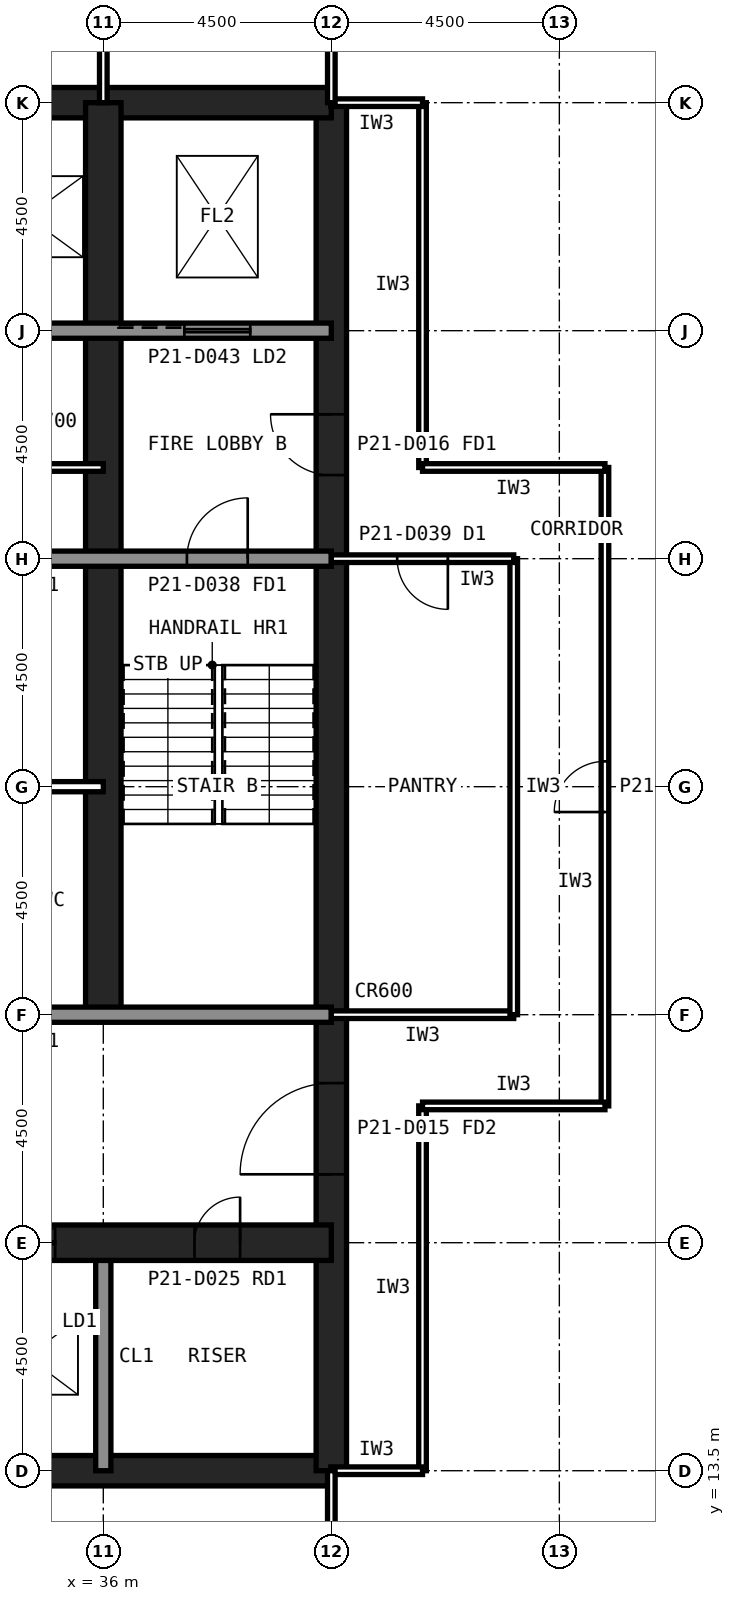
"""IFC4 building model, lengths in metres.
Left out: names, types, materials, properties, quantities, classifications, styles, units other than length and angle.
Written with IfcOpenShell. Run it as: python <this file> out.ifc"""

import sys

from ifc_helpers import new_model, si_unit, direction, frame, frame_2d, origin, place, context, subcontext, project, spatial, rectangle, extrude, element, fill, save


model = new_model("IFC4")
c1 = context("Model", 3, precision=1e-05, world=origin(), true_north=direction((0.0, 1.0)))
c2 = subcontext(c1, "Body", "Model", "MODEL_VIEW")
j1 = project(units=[si_unit("LENGTHUNIT", "METRE"), si_unit("PLANEANGLEUNIT", "RADIAN")], contexts=[c1])
p1 = place(None, origin())
s1 = spatial("IfcSite", under=j1, at=p1, CompositionType="ELEMENT")
p2 = place(p1, origin())
s2 = spatial("IfcBuilding", under=s1, at=p2, CompositionType="ELEMENT")
p3 = place(p2, frame((0.0, 0.0, 87.8)))
s3 = spatial("IfcBuildingStorey", under=s2, at=p3, CompositionType="ELEMENT", Elevation=87.8)
p4 = place(p3, frame((13.5, 13.5, 0.0), z_axis=(0.0, 0.0, 1.0), x_axis=(1.0, 0.0, 0.0)))
e1 = element("IfcWall", 1, at=p4, inside=s3, PredefinedType="SHEAR", context=c2, shape_type="SweptSolid", body=[
    extrude(rectangle(XDim=27.0, YDim=0.6, at=frame_2d((13.5, 0.0))), origin(), (0.0, 0.0, 1.0), 4.2),
])
p5 = place(p3, frame((40.5, 13.5, 0.0), z_axis=(0.0, 0.0, 1.0), x_axis=(0.0, 1.0, 0.0)))
e2 = element("IfcWall", 2, at=p5, inside=s3, PredefinedType="SHEAR", context=c2, shape_type="SweptSolid", body=[
    extrude(rectangle(XDim=27.0, YDim=0.6, at=frame_2d((13.5, 0.0))), origin(), (0.0, 0.0, 1.0), 4.2),
])
p6 = place(p5, frame((5.85, 0.0, 0.0)))
e3 = element("IfcOpeningElement", 3, at=p6, cuts=e2, PredefinedType="OPENING", context=c2, shape_type="SweptSolid", body=[
    extrude(rectangle(XDim=1.8, YDim=2.1, at=frame_2d((0.9, 1.05))), frame((0.0, 0.31, 0.0), z_axis=(0.0, -1.0, 0.0), x_axis=(1.0, 0.0, 0.0)), (0.0, 0.0, 1.0), 0.62),
])
p7 = place(p5, frame((19.65, 0.0, 0.0)))
e4 = element("IfcOpeningElement", 4, at=p7, cuts=e2, PredefinedType="OPENING", context=c2, shape_type="SweptSolid", body=[
    extrude(rectangle(XDim=1.2, YDim=2.1, at=frame_2d((0.6, 1.05))), frame((0.0, 0.31, 0.0), z_axis=(0.0, -1.0, 0.0), x_axis=(1.0, 0.0, 0.0)), (0.0, 0.0, 1.0), 0.62),
])
p8 = place(p3, frame((40.5, 40.5, 0.0), z_axis=(0.0, 0.0, 1.0), x_axis=(-1.0, 0.0, 0.0)))
e5 = element("IfcWall", 5, at=p8, inside=s3, PredefinedType="SHEAR", context=c2, shape_type="SweptSolid", body=[
    extrude(rectangle(XDim=27.0, YDim=0.6, at=frame_2d((13.5, 0.0))), origin(), (0.0, 0.0, 1.0), 4.2),
])
p9 = place(p3, frame((36.0, 13.5, 0.0), z_axis=(0.0, 0.0, 1.0), x_axis=(0.0, 1.0, 0.0)))
e6 = element("IfcWall", 6, at=p9, inside=s3, PredefinedType="SOLIDWALL", context=c2, shape_type="SweptSolid", body=[
    extrude(rectangle(XDim=4.5, YDim=0.3, at=frame_2d((2.25, 0.0))), origin(), (0.0, 0.0, 1.0), 4.04),
])
p10 = place(p3, frame((36.0, 22.5, 0.0), z_axis=(0.0, 0.0, 1.0), x_axis=(0.0, 1.0, 0.0)))
e7 = element("IfcWall", 7, at=p10, inside=s3, PredefinedType="SHEAR", context=c2, shape_type="SweptSolid", body=[
    extrude(rectangle(XDim=18.0, YDim=0.7, at=frame_2d((9.0, 0.0))), origin(), (0.0, 0.0, 1.0), 4.2),
])
p11 = place(p3, frame((13.5, 18.0, 0.0), z_axis=(0.0, 0.0, 1.0), x_axis=(1.0, 0.0, 0.0)))
e8 = element("IfcWall", 8, at=p11, inside=s3, PredefinedType="SHEAR", context=c2, shape_type="SweptSolid", body=[
    extrude(rectangle(XDim=27.0, YDim=0.7, at=frame_2d((13.5, 0.0))), origin(), (0.0, 0.0, 1.0), 4.2),
])
p12 = place(p11, frame((24.3, 0.0, 0.0)))
e9 = element("IfcOpeningElement", 9, at=p12, cuts=e8, PredefinedType="OPENING", context=c2, shape_type="SweptSolid", body=[
    extrude(rectangle(XDim=0.9, YDim=2.1, at=frame_2d((0.45, 1.05))), frame((0.0, 0.36, 0.0), z_axis=(0.0, -1.0, 0.0), x_axis=(1.0, 0.0, 0.0)), (0.0, 0.0, 1.0), 0.72),
])
p13 = place(p11, frame((5.45, 0.0, 0.0)))
e10 = element("IfcOpeningElement", 10, at=p13, cuts=e8, PredefinedType="OPENING", context=c2, shape_type="SweptSolid", body=[
    extrude(rectangle(XDim=1.1, YDim=2.1, at=frame_2d((0.55, 1.05))), frame((0.0, 0.36, 0.0), z_axis=(0.0, -1.0, 0.0), x_axis=(1.0, 0.0, 0.0)), (0.0, 0.0, 1.0), 0.72),
])
p14 = place(p11, frame((8.45, 0.0, 0.0)))
e11 = element("IfcOpeningElement", 11, at=p14, cuts=e8, PredefinedType="OPENING", context=c2, shape_type="SweptSolid", body=[
    extrude(rectangle(XDim=1.1, YDim=2.1, at=frame_2d((0.55, 1.05))), frame((0.0, 0.36, 0.0), z_axis=(0.0, -1.0, 0.0), x_axis=(1.0, 0.0, 0.0)), (0.0, 0.0, 1.0), 0.72),
])
p15 = place(p11, frame((11.45, 0.0, 0.0)))
e12 = element("IfcOpeningElement", 12, at=p15, cuts=e8, PredefinedType="OPENING", context=c2, shape_type="SweptSolid", body=[
    extrude(rectangle(XDim=1.1, YDim=2.1, at=frame_2d((0.55, 1.05))), frame((0.0, 0.36, 0.0), z_axis=(0.0, -1.0, 0.0), x_axis=(1.0, 0.0, 0.0)), (0.0, 0.0, 1.0), 0.72),
])
p16 = place(p11, frame((14.45, 0.0, 0.0)))
e13 = element("IfcOpeningElement", 13, at=p16, cuts=e8, PredefinedType="OPENING", context=c2, shape_type="SweptSolid", body=[
    extrude(rectangle(XDim=1.1, YDim=2.1, at=frame_2d((0.55, 1.05))), frame((0.0, 0.36, 0.0), z_axis=(0.0, -1.0, 0.0), x_axis=(1.0, 0.0, 0.0)), (0.0, 0.0, 1.0), 0.72),
])
p17 = place(p11, frame((17.45, 0.0, 0.0)))
e14 = element("IfcOpeningElement", 14, at=p17, cuts=e8, PredefinedType="OPENING", context=c2, shape_type="SweptSolid", body=[
    extrude(rectangle(XDim=1.1, YDim=2.1, at=frame_2d((0.55, 1.05))), frame((0.0, 0.36, 0.0), z_axis=(0.0, -1.0, 0.0), x_axis=(1.0, 0.0, 0.0)), (0.0, 0.0, 1.0), 0.72),
])
p18 = place(p11, frame((20.45, 0.0, 0.0)))
e15 = element("IfcOpeningElement", 15, at=p18, cuts=e8, PredefinedType="OPENING", context=c2, shape_type="SweptSolid", body=[
    extrude(rectangle(XDim=1.1, YDim=2.1, at=frame_2d((0.55, 1.05))), frame((0.0, 0.36, 0.0), z_axis=(0.0, -1.0, 0.0), x_axis=(1.0, 0.0, 0.0)), (0.0, 0.0, 1.0), 0.72),
])
p19 = place(p11, frame((1.6, 0.0, 0.0)))
e16 = element("IfcOpeningElement", 16, at=p19, cuts=e8, PredefinedType="OPENING", context=c2, shape_type="SweptSolid", body=[
    extrude(rectangle(XDim=1.3, YDim=2.2, at=frame_2d((0.65, 1.1))), frame((0.0, 0.36, 0.0), z_axis=(0.0, -1.0, 0.0), x_axis=(1.0, 0.0, 0.0)), (0.0, 0.0, 1.0), 0.72),
])
p20 = place(p3, frame((13.5, 36.0, 0.0), z_axis=(0.0, 0.0, 1.0), x_axis=(1.0, 0.0, 0.0)))
e17 = element("IfcWall", 17, at=p20, inside=s3, PredefinedType="SOLIDWALL", context=c2, shape_type="SweptSolid", body=[
    extrude(rectangle(XDim=27.0, YDim=0.3, at=frame_2d((13.5, 0.0))), origin(), (0.0, 0.0, 1.0), 4.04),
])
p21 = place(p20, frame((1.8, 0.0, 0.0)))
e18 = element("IfcOpeningElement", 18, at=p21, cuts=e17, PredefinedType="OPENING", context=c2, shape_type="SweptSolid", body=[
    extrude(rectangle(XDim=0.9, YDim=2.1, at=frame_2d((0.45, 1.05))), frame((0.0, 0.16, 0.0), z_axis=(0.0, -1.0, 0.0), x_axis=(1.0, 0.0, 0.0)), (0.0, 0.0, 1.0), 0.32),
])
p22 = place(p20, frame((24.1, 0.0, 0.0)))
e19 = element("IfcOpeningElement", 19, at=p22, cuts=e17, PredefinedType="OPENING", context=c2, shape_type="SweptSolid", body=[
    extrude(rectangle(XDim=1.3, YDim=2.2, at=frame_2d((0.65, 1.1))), frame((0.0, 0.16, 0.0), z_axis=(0.0, -1.0, 0.0), x_axis=(1.0, 0.0, 0.0)), (0.0, 0.0, 1.0), 0.32),
])
p23 = place(p3, frame((13.5, 22.5, 0.0), z_axis=(0.0, 0.0, 1.0), x_axis=(1.0, 0.0, 0.0)))
e20 = element("IfcWall", 20, at=p23, inside=s3, PredefinedType="SOLIDWALL", context=c2, shape_type="SweptSolid", body=[
    extrude(rectangle(XDim=27.0, YDim=0.3, at=frame_2d((13.5, 0.0))), origin(), (0.0, 0.0, 1.0), 4.04),
])
p24 = place(p23, frame((1.65, 0.0, 0.0)))
e21 = element("IfcOpeningElement", 21, at=p24, cuts=e20, PredefinedType="OPENING", context=c2, shape_type="SweptSolid", body=[
    extrude(rectangle(XDim=1.2, YDim=2.1, at=frame_2d((0.6, 1.05))), frame((0.0, 0.16, 0.0), z_axis=(0.0, -1.0, 0.0), x_axis=(1.0, 0.0, 0.0)), (0.0, 0.0, 1.0), 0.32),
])
p25 = place(p23, frame((6.025, 0.0, 0.0)))
e22 = element("IfcOpeningElement", 22, at=p25, cuts=e20, PredefinedType="OPENING", context=c2, shape_type="SweptSolid", body=[
    extrude(rectangle(XDim=1.0, YDim=2.1, at=frame_2d((0.5, 1.05))), frame((0.0, 0.16, 0.0), z_axis=(0.0, -1.0, 0.0), x_axis=(1.0, 0.0, 0.0)), (0.0, 0.0, 1.0), 0.32),
])
p26 = place(p23, frame((10.525, 0.0, 0.0)))
e23 = element("IfcOpeningElement", 23, at=p26, cuts=e20, PredefinedType="OPENING", context=c2, shape_type="SweptSolid", body=[
    extrude(rectangle(XDim=1.0, YDim=2.1, at=frame_2d((0.5, 1.05))), frame((0.0, 0.16, 0.0), z_axis=(0.0, -1.0, 0.0), x_axis=(1.0, 0.0, 0.0)), (0.0, 0.0, 1.0), 0.32),
])
p27 = place(p23, frame((19.75, 0.0, 0.0)))
e24 = element("IfcOpeningElement", 24, at=p27, cuts=e20, PredefinedType="OPENING", context=c2, shape_type="SweptSolid", body=[
    extrude(rectangle(XDim=1.0, YDim=2.1, at=frame_2d((0.5, 1.05))), frame((0.0, 0.16, 0.0), z_axis=(0.0, -1.0, 0.0), x_axis=(1.0, 0.0, 0.0)), (0.0, 0.0, 1.0), 0.32),
])
p28 = place(p23, frame((15.05, 0.0, 0.0)))
e25 = element("IfcOpeningElement", 25, at=p28, cuts=e20, PredefinedType="OPENING", context=c2, shape_type="SweptSolid", body=[
    extrude(rectangle(XDim=1.4, YDim=2.4, at=frame_2d((0.7, 1.2))), frame((0.0, 0.16, 0.0), z_axis=(0.0, -1.0, 0.0), x_axis=(1.0, 0.0, 0.0)), (0.0, 0.0, 1.0), 0.32),
])
p29 = place(p3, frame((13.5, 31.5, 0.0), z_axis=(0.0, 0.0, 1.0), x_axis=(1.0, 0.0, 0.0)))
e26 = element("IfcWall", 26, at=p29, inside=s3, PredefinedType="SOLIDWALL", context=c2, shape_type="SweptSolid", body=[
    extrude(rectangle(XDim=27.0, YDim=0.3, at=frame_2d((13.5, 0.0))), origin(), (0.0, 0.0, 1.0), 4.04),
])
p30 = place(p29, frame((24.15, 0.0, 0.0)))
e27 = element("IfcOpeningElement", 27, at=p30, cuts=e26, PredefinedType="OPENING", context=c2, shape_type="SweptSolid", body=[
    extrude(rectangle(XDim=1.2, YDim=2.1, at=frame_2d((0.6, 1.05))), frame((0.0, 0.16, 0.0), z_axis=(0.0, -1.0, 0.0), x_axis=(1.0, 0.0, 0.0)), (0.0, 0.0, 1.0), 0.32),
])
p31 = place(p29, frame((15.3, 0.0, 0.0)))
e28 = element("IfcOpeningElement", 28, at=p31, cuts=e26, PredefinedType="OPENING", context=c2, shape_type="SweptSolid", body=[
    extrude(rectangle(XDim=0.9, YDim=2.1, at=frame_2d((0.45, 1.05))), frame((0.0, 0.16, 0.0), z_axis=(0.0, -1.0, 0.0), x_axis=(1.0, 0.0, 0.0)), (0.0, 0.0, 1.0), 0.32),
])
p32 = place(p29, frame((19.8, 0.0, 0.0)))
e29 = element("IfcOpeningElement", 29, at=p32, cuts=e26, PredefinedType="OPENING", context=c2, shape_type="SweptSolid", body=[
    extrude(rectangle(XDim=0.9, YDim=2.1, at=frame_2d((0.45, 1.05))), frame((0.0, 0.16, 0.0), z_axis=(0.0, -1.0, 0.0), x_axis=(1.0, 0.0, 0.0)), (0.0, 0.0, 1.0), 0.32),
])
p33 = place(p3, frame((27.0, 27.0, 0.0), z_axis=(0.0, 0.0, 1.0), x_axis=(1.0, 0.0, 0.0)))
e30 = element("IfcWall", 30, at=p33, inside=s3, PredefinedType="PARTITIONING", context=c2, shape_type="SweptSolid", body=[
    extrude(rectangle(XDim=9.0, YDim=0.2, at=frame_2d((4.5, 0.0))), origin(), (0.0, 0.0, 1.0), 4.04),
])
p34 = place(p3, frame((45.9, 20.7, 0.0), z_axis=(0.0, 0.0, 1.0), x_axis=(0.0, 1.0, 0.0)))
e31 = element("IfcWall", 31, at=p34, inside=s3, PredefinedType="PARTITIONING", context=c2, shape_type="SweptSolid", body=[
    extrude(rectangle(XDim=12.6, YDim=0.15, at=frame_2d((6.3, 0.0))), origin(), (0.0, 0.0, 1.0), 4.04),
])
p35 = place(p34, frame((5.8, 0.0, 0.0)))
e32 = element("IfcOpeningElement", 32, at=p35, cuts=e31, PredefinedType="OPENING", context=c2, shape_type="SweptSolid", body=[
    extrude(rectangle(XDim=1.0, YDim=2.1, at=frame_2d((0.5, 1.05))), frame((0.0, 0.085, 0.0), z_axis=(0.0, -1.0, 0.0), x_axis=(1.0, 0.0, 0.0)), (0.0, 0.0, 1.0), 0.17),
])
for number, where, z_axis, x_axis in (
    (33, (42.3, 13.5, 0.0), (0.0, 0.0, 1.0), (0.0, 1.0, 0.0)),
    (34, (42.3, 33.3, 0.0), (0.0, 0.0, 1.0), (0.0, 1.0, 0.0)),
):
    element("IfcWall", number, at=place(p3, frame(where, z_axis=z_axis, x_axis=x_axis)), inside=s3, PredefinedType="PARTITIONING", context=c2, shape_type="SweptSolid", body=[
        extrude(rectangle(XDim=7.2, YDim=0.15, at=frame_2d((3.6, 0.0))), origin(), (0.0, 0.0, 1.0), 4.04),
    ])
for number, where, z_axis, x_axis in (
    (35, (42.3, 20.7, 0.0), (0.0, 0.0, 1.0), (1.0, 0.0, 0.0)),
    (36, (45.9, 33.3, 0.0), (0.0, 0.0, 1.0), (-1.0, 0.0, 0.0)),
):
    element("IfcWall", number, at=place(p3, frame(where, z_axis=z_axis, x_axis=x_axis)), inside=s3, PredefinedType="PARTITIONING", context=c2, shape_type="SweptSolid", body=[
        extrude(rectangle(XDim=3.6, YDim=0.15, at=frame_2d((1.8, 0.0))), origin(), (0.0, 0.0, 1.0), 4.04),
    ])
for number, where, z_axis, x_axis in (
    (37, (40.49, 13.5, 0.0), (0.0, 0.0, 1.0), (1.0, 0.0, 0.0)),
    (38, (42.3, 40.5, 0.0), (0.0, 0.0, 1.0), (-1.0, 0.0, 0.0)),
):
    element("IfcWall", number, at=place(p3, frame(where, z_axis=z_axis, x_axis=x_axis)), inside=s3, PredefinedType="PARTITIONING", context=c2, shape_type="SweptSolid", body=[
        extrude(rectangle(XDim=1.81, YDim=0.15, at=frame_2d((0.905, 0.0))), origin(), (0.0, 0.0, 1.0), 3.189),
    ])
p36 = place(p3, frame((40.5, 22.5, 0.0), z_axis=(0.0, 0.0, 1.0), x_axis=(1.0, 0.0, 0.0)))
e39 = element("IfcWall", 39, at=p36, inside=s3, PredefinedType="PARTITIONING", context=c2, shape_type="SweptSolid", body=[
    extrude(rectangle(XDim=3.6, YDim=0.15, at=frame_2d((1.8, 0.0))), origin(), (0.0, 0.0, 1.0), 3.189),
])
p37 = place(p3, frame((44.1, 22.5, 0.0), z_axis=(0.0, 0.0, 1.0), x_axis=(0.0, 1.0, 0.0)))
e40 = element("IfcWall", 40, at=p37, inside=s3, PredefinedType="PARTITIONING", context=c2, shape_type="SweptSolid", body=[
    extrude(rectangle(XDim=9.0, YDim=0.15, at=frame_2d((4.5, 0.0))), origin(), (0.0, 0.0, 1.0), 4.04),
])
p38 = place(p3, frame((44.1, 31.5, 0.0), z_axis=(0.0, 0.0, 1.0), x_axis=(-1.0, 0.0, 0.0)))
e41 = element("IfcWall", 41, at=p38, inside=s3, PredefinedType="PARTITIONING", context=c2, shape_type="SweptSolid", body=[
    extrude(rectangle(XDim=3.6, YDim=0.15, at=frame_2d((1.8, 0.0))), origin(), (0.0, 0.0, 1.0), 3.189),
])
p39 = place(p38, frame((1.3, 0.0, 0.0)))
e42 = element("IfcOpeningElement", 42, at=p39, cuts=e41, PredefinedType="OPENING", context=c2, shape_type="SweptSolid", body=[
    extrude(rectangle(XDim=1.0, YDim=2.1, at=frame_2d((0.5, 1.05))), frame((0.0, 0.085, 0.0), z_axis=(0.0, -1.0, 0.0), x_axis=(1.0, 0.0, 0.0)), (0.0, 0.0, 1.0), 0.17),
])
p40 = place(p3, frame((36.0, 40.5, 0.0), z_axis=(0.0, 0.0, 1.0), x_axis=(0.0, 1.0, 0.0)))
e43 = element("IfcWall", 43, at=p40, inside=s3, PredefinedType="PARTITIONING", context=c2, shape_type="SweptSolid", body=[
    extrude(rectangle(XDim=4.5, YDim=0.15, at=frame_2d((2.25, 0.0))), origin(), (0.0, 0.0, 1.0), 3.189),
])
p41 = place(p3, frame((40.5, 53.555, 0.0), z_axis=(0.0, 0.0, 1.0), x_axis=(0.0, -1.0, 0.0)))
e44 = element("IfcWall", 44, at=p41, inside=s3, PredefinedType="PARTITIONING", context=c2, shape_type="SweptSolid", body=[
    extrude(rectangle(XDim=13.055, YDim=0.15, at=frame_2d((6.527, 0.0))), origin(), (0.0, 0.0, 1.0), 3.189),
])
p42 = place(p41, frame((6.028, 0.0, 0.0)))
e45 = element("IfcOpeningElement", 45, at=p42, cuts=e44, PredefinedType="OPENING", context=c2, shape_type="SweptSolid", body=[
    extrude(rectangle(XDim=1.0, YDim=2.1, at=frame_2d((0.5, 1.05))), frame((0.0, 0.085, 0.0), z_axis=(0.0, -1.0, 0.0), x_axis=(1.0, 0.0, 0.0)), (0.0, 0.0, 1.0), 0.17),
])
p43 = place(p3, frame((40.5, 0.445, 0.0), z_axis=(0.0, 0.0, 1.0), x_axis=(0.0, 1.0, 0.0)))
e46 = element("IfcWall", 46, at=p43, inside=s3, PredefinedType="PARTITIONING", context=c2, shape_type="SweptSolid", body=[
    extrude(rectangle(XDim=13.055, YDim=0.15, at=frame_2d((6.527, 0.0))), origin(), (0.0, 0.0, 1.0), 3.189),
])
p44 = place(p43, frame((6.028, 0.0, 0.0)))
e47 = element("IfcOpeningElement", 47, at=p44, cuts=e46, PredefinedType="OPENING", context=c2, shape_type="SweptSolid", body=[
    extrude(rectangle(XDim=1.0, YDim=2.1, at=frame_2d((0.5, 1.05))), frame((0.0, 0.085, 0.0), z_axis=(0.0, -1.0, 0.0), x_axis=(1.0, 0.0, 0.0)), (0.0, 0.0, 1.0), 0.17),
])
p45 = place(p6, origin())
e48 = element("IfcDoor", 48, at=p45, inside=s3, OperationType="SINGLE_SWING_LEFT", PredefinedType="DOOR", context=c2, shape_type="SweptSolid", body=[
    extrude(rectangle(XDim=1.8, YDim=2.1, at=frame_2d((0.9, 1.05))), frame((0.0, 0.025, 0.0), z_axis=(0.0, -1.0, 0.0), x_axis=(1.0, 0.0, 0.0)), (0.0, 0.0, 1.0), 0.05),
])
fill(e3, e48)
p46 = place(p7, origin())
e49 = element("IfcDoor", 49, at=p46, inside=s3, OperationType="SINGLE_SWING_RIGHT", PredefinedType="DOOR", context=c2, shape_type="SweptSolid", body=[
    extrude(rectangle(XDim=1.2, YDim=2.1, at=frame_2d((0.6, 1.05))), frame((0.0, 0.025, 0.0), z_axis=(0.0, -1.0, 0.0), x_axis=(1.0, 0.0, 0.0)), (0.0, 0.0, 1.0), 0.05),
])
fill(e4, e49)
p47 = place(p30, origin())
e50 = element("IfcDoor", 50, at=p47, inside=s3, OperationType="SINGLE_SWING_RIGHT", PredefinedType="DOOR", context=c2, shape_type="SweptSolid", body=[
    extrude(rectangle(XDim=1.2, YDim=2.1, at=frame_2d((0.6, 1.05))), frame((0.0, 0.025, 0.0), z_axis=(0.0, -1.0, 0.0), x_axis=(1.0, 0.0, 0.0)), (0.0, 0.0, 1.0), 0.05),
])
fill(e27, e50)
p48 = place(p12, origin())
e51 = element("IfcDoor", 51, at=p48, inside=s3, OperationType="SINGLE_SWING_RIGHT", PredefinedType="DOOR", context=c2, shape_type="SweptSolid", body=[
    extrude(rectangle(XDim=0.9, YDim=2.1, at=frame_2d((0.45, 1.05))), frame((0.0, 0.025, 0.0), z_axis=(0.0, -1.0, 0.0), x_axis=(1.0, 0.0, 0.0)), (0.0, 0.0, 1.0), 0.05),
])
fill(e9, e51)
p49 = place(p18, origin())
e52 = element("IfcDoor", 52, at=p49, inside=s3, OperationType="SLIDING_TO_LEFT", PredefinedType="DOOR", context=c2, shape_type="SweptSolid", body=[
    extrude(rectangle(XDim=1.1, YDim=2.1, at=frame_2d((0.55, 1.05))), frame((0.0, 0.025, 0.0), z_axis=(0.0, -1.0, 0.0), x_axis=(1.0, 0.0, 0.0)), (0.0, 0.0, 1.0), 0.05),
])
fill(e15, e52)
p50 = place(p22, origin())
e53 = element("IfcDoor", 53, at=p50, inside=s3, OperationType="SLIDING_TO_LEFT", PredefinedType="DOOR", context=c2, shape_type="SweptSolid", body=[
    extrude(rectangle(XDim=1.3, YDim=2.2, at=frame_2d((0.65, 1.1))), frame((0.0, 0.025, 0.0), z_axis=(0.0, -1.0, 0.0), x_axis=(1.0, 0.0, 0.0)), (0.0, 0.0, 1.0), 0.05),
])
fill(e19, e53)
p51 = place(p35, origin())
e54 = element("IfcDoor", 54, at=p51, inside=s3, OperationType="SINGLE_SWING_LEFT", PredefinedType="DOOR", context=c2, shape_type="SweptSolid", body=[
    extrude(rectangle(XDim=1.0, YDim=2.1, at=frame_2d((0.5, 1.05))), frame((0.0, 0.025, 0.0), z_axis=(0.0, -1.0, 0.0), x_axis=(1.0, 0.0, 0.0)), (0.0, 0.0, 1.0), 0.05),
])
fill(e32, e54)
p52 = place(p39, origin())
e55 = element("IfcDoor", 55, at=p52, inside=s3, OperationType="SINGLE_SWING_LEFT", PredefinedType="DOOR", context=c2, shape_type="SweptSolid", body=[
    extrude(rectangle(XDim=1.0, YDim=2.1, at=frame_2d((0.5, 1.05))), frame((0.0, 0.025, 0.0), z_axis=(0.0, -1.0, 0.0), x_axis=(1.0, 0.0, 0.0)), (0.0, 0.0, 1.0), 0.05),
])
fill(e42, e55)
save(model, sys.argv[1])
